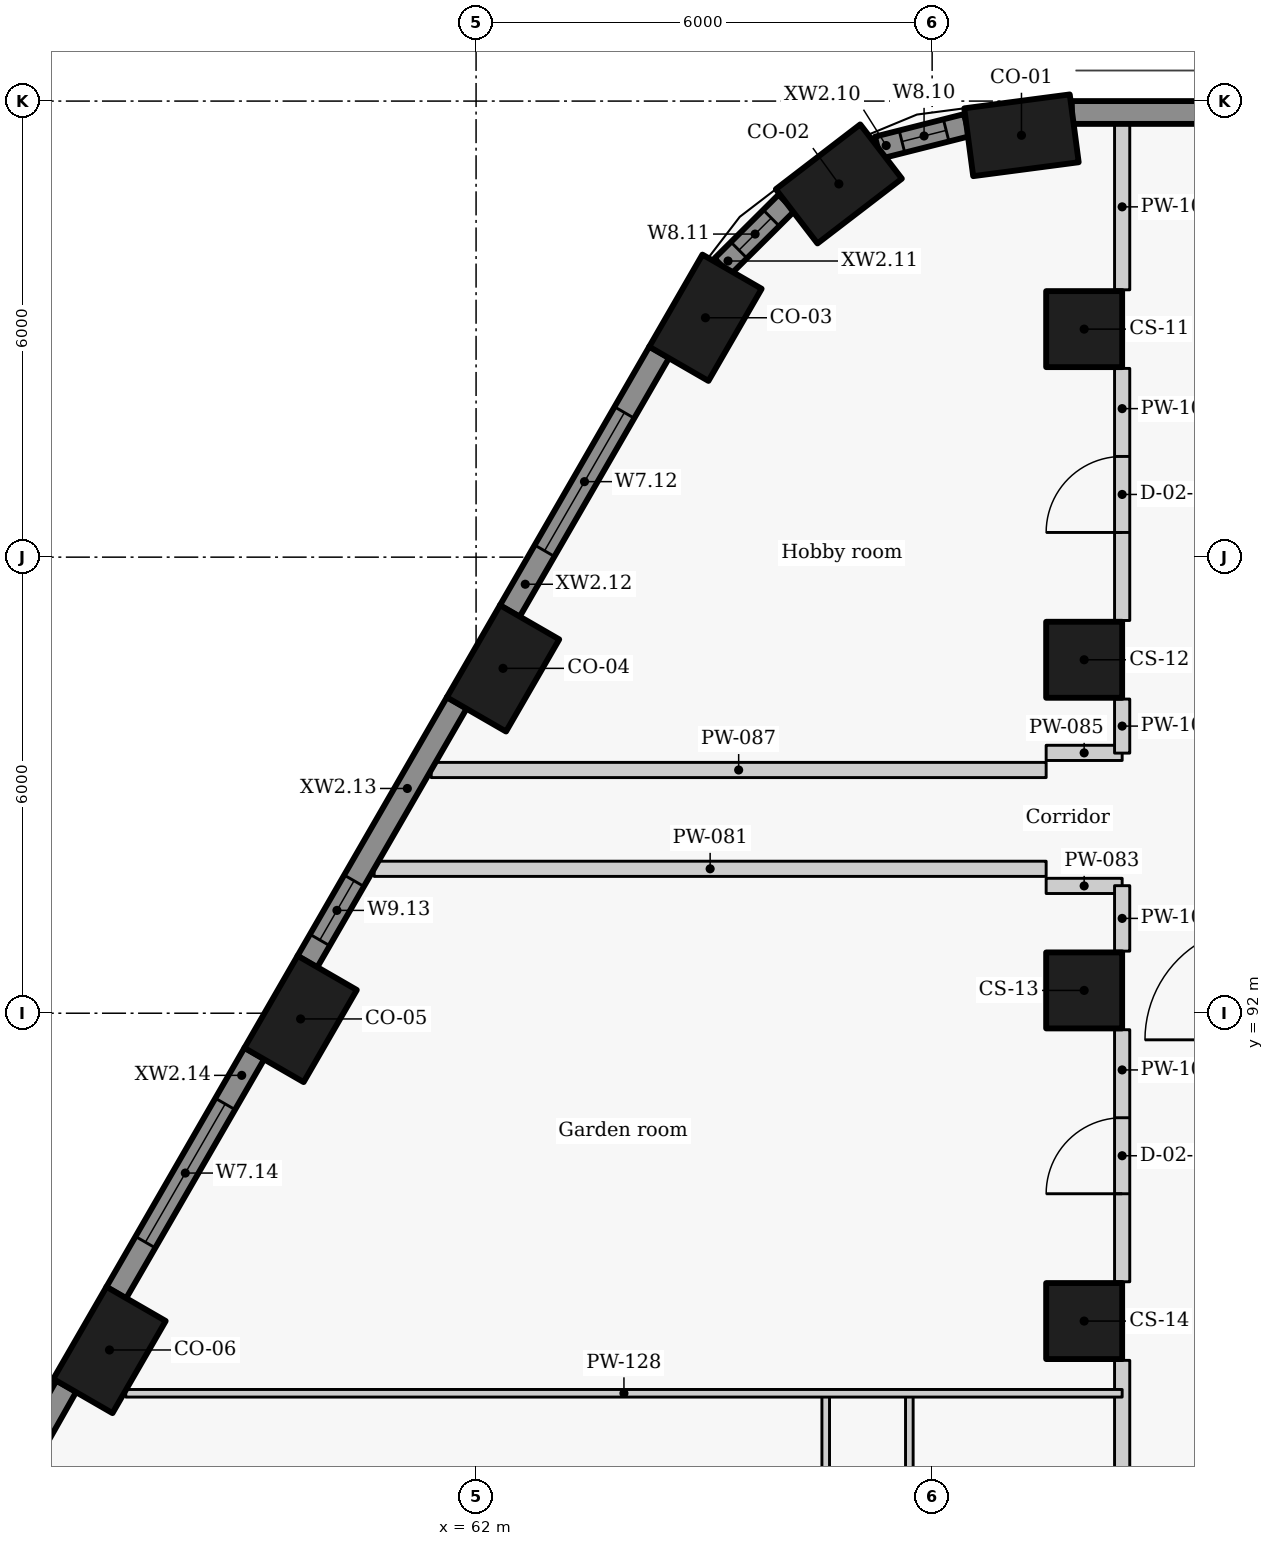
"""IFC4 building model, lengths in metres.
Left out: names, types, materials, properties, quantities, classifications, styles, units other than length and angle.
Written with IfcOpenShell. Run it as: python <this file> out.ifc"""

import sys

from ifc_helpers import new_model, si_unit, direction, frame, frame_2d, origin, origin_2d, place, context, subcontext, project, spatial, rectangle, extrude, element, fill, save


model = new_model("IFC4")
c1 = context("Model", 3, precision=1e-05, world=origin(), true_north=direction((0.0, 1.0)))
c2 = subcontext(c1, "Body", "Model", "MODEL_VIEW")
j1 = project(units=[si_unit("LENGTHUNIT", "METRE"), si_unit("PLANEANGLEUNIT", "RADIAN")], contexts=[c1])
p1 = place(None, origin())
s1 = spatial("IfcSite", under=j1, at=p1, CompositionType="ELEMENT")
p2 = place(p1, origin())
s2 = spatial("IfcBuilding", under=s1, at=p2, CompositionType="ELEMENT")
p3 = place(p2, frame((0.0, 0.0, 97.5)))
s3 = spatial("IfcBuildingStorey", under=s2, at=p3, CompositionType="ELEMENT", Elevation=97.5)
for number, where, z_axis, x_axis in (
    (1, (69.175, 103.55, 0.0), (0.0, 0.0, 1.0), (-0.991, -0.131, 0.0)),
    (2, (66.773, 102.91, 0.0), (0.0, 0.0, 1.0), (-0.793, -0.609, 0.0)),
    (3, (65.018, 101.149, 0.0), (0.0, 0.0, 1.0), (-0.5, -0.866, 0.0)),
    (4, (62.354, 96.537, 0.0), (0.0, 0.0, 1.0), (-0.5, -0.866, 0.0)),
    (5, (59.692, 91.925, 0.0), (0.0, 0.0, 1.0), (-0.5, -0.866, 0.0)),
    (6, (57.177, 87.57, 0.0), (0.0, 0.0, 1.0), (-0.5, -0.866, 0.0)),
):
    element("IfcColumn", number, at=place(p3, frame(where, z_axis=z_axis, x_axis=x_axis)), inside=s3, PredefinedType="COLUMN", context=c2, shape_type="SweptSolid", body=[
        extrude(rectangle(XDim=1.4, YDim=0.9, at=origin_2d()), origin(), (0.0, 0.0, 1.0), 3.3),
    ])
for number, where, z_axis, x_axis in (
    (7, (70.0, 101.0, 0.0), (0.0, 0.0, 1.0), (0.0, -1.0, 0.0)),
    (8, (70.0, 96.65, 0.0), (0.0, 0.0, 1.0), (0.0, -1.0, 0.0)),
    (9, (70.0, 92.3, 0.0), (0.0, 0.0, 1.0), (0.0, -1.0, 0.0)),
    (10, (70.0, 87.95, 0.0), (0.0, 0.0, 1.0), (0.0, -1.0, 0.0)),
):
    element("IfcColumn", number, at=place(p3, frame(where, z_axis=z_axis, x_axis=x_axis)), inside=s3, PredefinedType="COLUMN", context=c2, shape_type="SweptSolid", body=[
        extrude(rectangle(XDim=1.0, YDim=1.0, at=origin_2d()), origin(), (0.0, 0.0, 1.0), 3.3),
    ])
p4 = place(p3, frame((90.129, 103.85, 0.0), z_axis=(0.0, 0.0, 1.0), x_axis=(-1.0, 0.0, 0.0)))
e11 = element("IfcWall", 11, at=p4, inside=s3, PredefinedType="SOLIDWALL", context=c2, shape_type="SweptSolid", body=[
    extrude(rectangle(XDim=20.291, YDim=0.3, at=frame_2d((10.146, 0.0))), origin(), (0.0, 0.0, 1.0), 2.425),
])
p5 = place(p3, frame((68.456, 103.683, 0.0), z_axis=(0.0, 0.0, 1.0), x_axis=(-0.969485113966, -0.245150186208, 0.0)))
e12 = element("IfcWall", 12, at=p5, inside=s3, PredefinedType="SOLIDWALL", context=c2, shape_type="SweptSolid", body=[
    extrude(rectangle(XDim=1.208, YDim=0.3, at=frame_2d((0.604, 0.0))), origin(), (0.0, 0.0, 1.0), 2.425),
])
p6 = place(p5, frame((0.28, 0.0, 0.9)))
e13 = element("IfcOpeningElement", 13, at=p6, cuts=e12, PredefinedType="OPENING", context=c2, shape_type="SweptSolid", body=[
    extrude(rectangle(XDim=0.6, YDim=1.1, at=frame_2d((0.3, 0.55))), frame((0.0, 0.16, 0.0), z_axis=(0.0, -1.0, 0.0), x_axis=(1.0, 0.0, 0.0)), (0.0, 0.0, 1.0), 0.32),
])
p7 = place(p3, frame((66.085, 102.663, 0.0), z_axis=(0.0, 0.0, 1.0), x_axis=(-0.708951665509, -0.705257070842, 0.0)))
e14 = element("IfcWall", 14, at=p7, inside=s3, PredefinedType="SOLIDWALL", context=c2, shape_type="SweptSolid", body=[
    extrude(rectangle(XDim=1.189, YDim=0.3, at=frame_2d((0.595, 0.0))), origin(), (0.0, 0.0, 1.0), 2.425),
])
p8 = place(p7, frame((0.284, 0.0, 0.9)))
e15 = element("IfcOpeningElement", 15, at=p8, cuts=e14, PredefinedType="OPENING", context=c2, shape_type="SweptSolid", body=[
    extrude(rectangle(XDim=0.6, YDim=1.1, at=frame_2d((0.3, 0.55))), frame((0.0, 0.16, 0.0), z_axis=(0.0, -1.0, 0.0), x_axis=(1.0, 0.0, 0.0)), (0.0, 0.0, 1.0), 0.32),
])
p9 = place(p3, frame((64.41, 100.697, 0.0), z_axis=(0.0, 0.0, 1.0), x_axis=(-0.500003583557, -0.866023334807, 0.0)))
e16 = element("IfcWall", 16, at=p9, inside=s3, PredefinedType="SOLIDWALL", context=c2, shape_type="SweptSolid", body=[
    extrude(rectangle(XDim=3.934, YDim=0.3, at=frame_2d((1.967, 0.0))), origin(), (0.0, 0.0, 1.0), 2.425),
])
p10 = place(p9, frame((0.917, 0.0, 0.9)))
e17 = element("IfcOpeningElement", 17, at=p10, cuts=e16, PredefinedType="OPENING", context=c2, shape_type="SweptSolid", body=[
    extrude(rectangle(XDim=2.1, YDim=1.1, at=frame_2d((1.05, 0.55))), frame((0.0, 0.16, 0.0), z_axis=(0.0, -1.0, 0.0), x_axis=(1.0, 0.0, 0.0)), (0.0, 0.0, 1.0), 0.32),
])
p11 = place(p3, frame((61.747, 96.084, 0.0), z_axis=(0.0, 0.0, 1.0), x_axis=(-0.499957037901, -0.866050206543, 0.0)))
e18 = element("IfcWall", 18, at=p11, inside=s3, PredefinedType="SOLIDWALL", context=c2, shape_type="SweptSolid", body=[
    extrude(rectangle(XDim=3.934, YDim=0.3, at=frame_2d((1.967, 0.0))), origin(), (0.0, 0.0, 1.0), 2.425),
])
p12 = place(p11, frame((2.704, 0.0, 0.9)))
e19 = element("IfcOpeningElement", 19, at=p12, cuts=e18, PredefinedType="OPENING", context=c2, shape_type="SweptSolid", body=[
    extrude(rectangle(XDim=0.9, YDim=1.1, at=frame_2d((0.45, 0.55))), frame((0.0, 0.16, 0.0), z_axis=(0.0, -1.0, 0.0), x_axis=(1.0, 0.0, 0.0)), (0.0, 0.0, 1.0), 0.32),
])
p13 = place(p3, frame((59.084, 91.472, 0.0), z_axis=(0.0, 0.0, 1.0), x_axis=(-0.500009139881, -0.866020126807, 0.0)))
e20 = element("IfcWall", 20, at=p13, inside=s3, PredefinedType="SOLIDWALL", context=c2, shape_type="SweptSolid", body=[
    extrude(rectangle(XDim=3.637, YDim=0.3, at=frame_2d((1.818, 0.0))), origin(), (0.0, 0.0, 1.0), 2.425),
])
p14 = place(p13, frame((0.768, 0.0, 0.9)))
e21 = element("IfcOpeningElement", 21, at=p14, cuts=e20, PredefinedType="OPENING", context=c2, shape_type="SweptSolid", body=[
    extrude(rectangle(XDim=2.1, YDim=1.1, at=frame_2d((1.05, 0.55))), frame((0.0, 0.16, 0.0), z_axis=(0.0, -1.0, 0.0), x_axis=(1.0, 0.0, 0.0)), (0.0, 0.0, 1.0), 0.32),
])
p15 = place(p3, frame((56.609, 87.094, 0.0), z_axis=(0.0, 0.0, 1.0), x_axis=(-0.492456858874, -0.870336855561, 0.0)))
e22 = element("IfcWall", 22, at=p15, inside=s3, PredefinedType="SOLIDWALL", context=c2, shape_type="SweptSolid", body=[
    extrude(rectangle(XDim=5.677, YDim=0.3, at=frame_2d((2.838, 0.0))), origin(), (0.0, 0.0, 1.0), 2.425),
])
p16 = place(p15, frame((1.525, 0.0, 0.9)))
e23 = element("IfcOpeningElement", 23, at=p16, cuts=e22, PredefinedType="OPENING", context=c2, shape_type="SweptSolid", body=[
    extrude(rectangle(XDim=2.1, YDim=1.1, at=frame_2d((1.05, 0.55))), frame((0.0, 0.16, 0.0), z_axis=(0.0, -1.0, 0.0), x_axis=(1.0, 0.0, 0.0)), (0.0, 0.0, 1.0), 0.32),
])
p17 = place(p3, frame((60.659, 93.9, 0.0), z_axis=(0.0, 0.0, 1.0), x_axis=(1.0, 0.0, 0.0)))
e24 = element("IfcWall", 24, at=p17, inside=s3, PredefinedType="PARTITIONING", context=c2, shape_type="SweptSolid", body=[
    extrude(rectangle(XDim=8.841, YDim=0.2, at=frame_2d((4.421, 0.0))), origin(), (0.0, 0.0, 1.0), 2.405),
])
for number, where, z_axis, x_axis in (
    (25, (69.5, 93.675, 0.0), (0.0, 0.0, 1.0), (1.0, 0.0, 0.0)),
    (26, (69.5, 95.425, 0.0), (0.0, 0.0, 1.0), (1.0, 0.0, 0.0)),
):
    element("IfcWall", number, at=place(p3, frame(where, z_axis=z_axis, x_axis=x_axis)), inside=s3, PredefinedType="PARTITIONING", context=c2, shape_type="SweptSolid", body=[
        extrude(rectangle(XDim=1.0, YDim=0.2, at=frame_2d((0.5, 0.0))), origin(), (0.0, 0.0, 1.0), 2.505),
    ])
p18 = place(p3, frame((61.409, 95.2, 0.0), z_axis=(0.0, 0.0, 1.0), x_axis=(1.0, 0.0, 0.0)))
e27 = element("IfcWall", 27, at=p18, inside=s3, PredefinedType="PARTITIONING", context=c2, shape_type="SweptSolid", body=[
    extrude(rectangle(XDim=8.091, YDim=0.2, at=frame_2d((4.045, 0.0))), origin(), (0.0, 0.0, 1.0), 2.405),
])
p19 = place(p3, frame((70.5, 83.167, 0.0), z_axis=(0.0, 0.0, 1.0), x_axis=(0.0, 1.0, 0.0)))
e28 = element("IfcWall", 28, at=p19, inside=s3, PredefinedType="PARTITIONING", context=c2, shape_type="SweptSolid", body=[
    extrude(rectangle(XDim=4.266, YDim=0.2, at=frame_2d((2.133, 0.0))), origin(), (0.0, 0.0, 1.0), 3.025),
])
p20 = place(p3, frame((70.5, 88.467, 0.0), z_axis=(0.0, 0.0, 1.0), x_axis=(0.0, 1.0, 0.0)))
e29 = element("IfcWall", 29, at=p20, inside=s3, PredefinedType="PARTITIONING", context=c2, shape_type="SweptSolid", body=[
    extrude(rectangle(XDim=3.316, YDim=0.2, at=frame_2d((1.658, 0.0))), origin(), (0.0, 0.0, 1.0), 3.025),
])
p21 = place(p20, frame((1.158, 0.0, 0.0)))
e30 = element("IfcOpeningElement", 30, at=p21, cuts=e29, PredefinedType="OPENING", context=c2, shape_type="SweptSolid", body=[
    extrude(rectangle(XDim=1.0, YDim=2.1, at=frame_2d((0.5, 1.05))), frame((0.0, 0.11, 0.0), z_axis=(0.0, -1.0, 0.0), x_axis=(1.0, 0.0, 0.0)), (0.0, 0.0, 1.0), 0.22),
])
p22 = place(p3, frame((70.5, 92.817, 0.0), z_axis=(0.0, 0.0, 1.0), x_axis=(0.0, 1.0, 0.0)))
e31 = element("IfcWall", 31, at=p22, inside=s3, PredefinedType="PARTITIONING", context=c2, shape_type="SweptSolid", body=[
    extrude(rectangle(XDim=0.861, YDim=0.2, at=frame_2d((0.431, 0.0))), origin(), (0.0, 0.0, 1.0), 3.025),
])
p23 = place(p3, frame((70.5, 95.422, 0.0), z_axis=(0.0, 0.0, 1.0), x_axis=(0.0, 1.0, 0.0)))
e32 = element("IfcWall", 32, at=p23, inside=s3, PredefinedType="PARTITIONING", context=c2, shape_type="SweptSolid", body=[
    extrude(rectangle(XDim=0.711, YDim=0.2, at=frame_2d((0.355, 0.0))), origin(), (0.0, 0.0, 1.0), 3.025),
])
p24 = place(p3, frame((70.5, 97.167, 0.0), z_axis=(0.0, 0.0, 1.0), x_axis=(0.0, 1.0, 0.0)))
e33 = element("IfcWall", 33, at=p24, inside=s3, PredefinedType="PARTITIONING", context=c2, shape_type="SweptSolid", body=[
    extrude(rectangle(XDim=3.316, YDim=0.2, at=frame_2d((1.658, 0.0))), origin(), (0.0, 0.0, 1.0), 3.025),
])
p25 = place(p24, frame((1.158, 0.0, 0.0)))
e34 = element("IfcOpeningElement", 34, at=p25, cuts=e33, PredefinedType="OPENING", context=c2, shape_type="SweptSolid", body=[
    extrude(rectangle(XDim=1.0, YDim=2.1, at=frame_2d((0.5, 1.05))), frame((0.0, 0.11, 0.0), z_axis=(0.0, -1.0, 0.0), x_axis=(1.0, 0.0, 0.0)), (0.0, 0.0, 1.0), 0.22),
])
p26 = place(p3, frame((70.5, 101.517, 0.0), z_axis=(0.0, 0.0, 1.0), x_axis=(0.0, 1.0, 0.0)))
e35 = element("IfcWall", 35, at=p26, inside=s3, PredefinedType="PARTITIONING", context=c2, shape_type="SweptSolid", body=[
    extrude(rectangle(XDim=2.183, YDim=0.2, at=frame_2d((1.091, 0.0))), origin(), (0.0, 0.0, 1.0), 3.025),
])
p27 = place(p3, frame((67.7, 87.0, 0.0), z_axis=(0.0, 0.0, 1.0), x_axis=(0.0, -1.0, 0.0)))
e36 = element("IfcWall", 36, at=p27, inside=s3, PredefinedType="PARTITIONING", context=c2, shape_type="SweptSolid", body=[
    extrude(rectangle(XDim=7.4, YDim=0.1, at=frame_2d((3.7, 0.0))), origin(), (0.0, 0.0, 1.0), 3.025),
])
p28 = place(p27, frame((5.293, 0.0, 0.0)))
e37 = element("IfcOpeningElement", 37, at=p28, cuts=e36, PredefinedType="OPENING", context=c2, shape_type="SweptSolid", body=[
    extrude(rectangle(XDim=0.85, YDim=2.1, at=frame_2d((0.425, 1.05))), frame((0.0, 0.06, 0.0), z_axis=(0.0, -1.0, 0.0), x_axis=(1.0, 0.0, 0.0)), (0.0, 0.0, 1.0), 0.12),
])
p29 = place(p27, frame((1.568, 0.0, 0.0)))
e38 = element("IfcOpeningElement", 38, at=p29, cuts=e36, PredefinedType="OPENING", context=c2, shape_type="SweptSolid", body=[
    extrude(rectangle(XDim=0.9, YDim=2.1, at=frame_2d((0.45, 1.05))), frame((0.0, 0.06, 0.0), z_axis=(0.0, -1.0, 0.0), x_axis=(1.0, 0.0, 0.0)), (0.0, 0.0, 1.0), 0.12),
])
p30 = place(p3, frame((66.6, 66.8, 0.0), z_axis=(0.0, 0.0, 1.0), x_axis=(0.0, 1.0, 0.0)))
e39 = element("IfcWall", 39, at=p30, inside=s3, PredefinedType="PARTITIONING", context=c2, shape_type="SweptSolid", body=[
    extrude(rectangle(XDim=20.2, YDim=0.1, at=frame_2d((10.1, 0.0))), origin(), (0.0, 0.0, 1.0), 3.025),
])
p31 = place(p30, frame((1.176, 0.0, 0.0)))
e40 = element("IfcOpeningElement", 40, at=p31, cuts=e39, PredefinedType="OPENING", context=c2, shape_type="SweptSolid", body=[
    extrude(rectangle(XDim=0.9, YDim=2.1, at=frame_2d((0.45, 1.05))), frame((0.0, 0.06, 0.0), z_axis=(0.0, -1.0, 0.0), x_axis=(1.0, 0.0, 0.0)), (0.0, 0.0, 1.0), 0.12),
])
p32 = place(p30, frame((5.15, 0.0, 0.0)))
e41 = element("IfcOpeningElement", 41, at=p32, cuts=e39, PredefinedType="OPENING", context=c2, shape_type="SweptSolid", body=[
    extrude(rectangle(XDim=0.9, YDim=2.1, at=frame_2d((0.45, 1.05))), frame((0.0, 0.06, 0.0), z_axis=(0.0, -1.0, 0.0), x_axis=(1.0, 0.0, 0.0)), (0.0, 0.0, 1.0), 0.12),
])
p33 = place(p30, frame((9.124, 0.0, 0.0)))
e42 = element("IfcOpeningElement", 42, at=p33, cuts=e39, PredefinedType="OPENING", context=c2, shape_type="SweptSolid", body=[
    extrude(rectangle(XDim=0.9, YDim=2.1, at=frame_2d((0.45, 1.05))), frame((0.0, 0.06, 0.0), z_axis=(0.0, -1.0, 0.0), x_axis=(1.0, 0.0, 0.0)), (0.0, 0.0, 1.0), 0.12),
])
p34 = place(p30, frame((15.25, 0.0, 0.0)))
e43 = element("IfcOpeningElement", 43, at=p34, cuts=e39, PredefinedType="OPENING", context=c2, shape_type="SweptSolid", body=[
    extrude(rectangle(XDim=0.9, YDim=2.1, at=frame_2d((0.45, 1.05))), frame((0.0, 0.06, 0.0), z_axis=(0.0, -1.0, 0.0), x_axis=(1.0, 0.0, 0.0)), (0.0, 0.0, 1.0), 0.12),
])
p35 = place(p3, frame((57.391, 87.0, 0.0), z_axis=(0.0, 0.0, 1.0), x_axis=(1.0, 0.0, 0.0)))
e44 = element("IfcWall", 44, at=p35, inside=s3, PredefinedType="PARTITIONING", context=c2, shape_type="SweptSolid", body=[
    extrude(rectangle(XDim=13.109, YDim=0.1, at=frame_2d((6.555, 0.0))), origin(), (0.0, 0.0, 1.0), 2.505),
])
p36 = place(p6, origin())
e45 = element("IfcWindow", 45, at=p36, inside=s3, PartitioningType="SINGLE_PANEL", PredefinedType="WINDOW", context=c2, shape_type="SweptSolid", body=[
    extrude(rectangle(XDim=0.6, YDim=1.1, at=frame_2d((0.3, 0.55))), frame((0.0, 0.03, 0.0), z_axis=(0.0, -1.0, 0.0), x_axis=(1.0, 0.0, 0.0)), (0.0, 0.0, 1.0), 0.06),
])
fill(e13, e45)
p37 = place(p8, origin())
e46 = element("IfcWindow", 46, at=p37, inside=s3, PartitioningType="SINGLE_PANEL", PredefinedType="WINDOW", context=c2, shape_type="SweptSolid", body=[
    extrude(rectangle(XDim=0.6, YDim=1.1, at=frame_2d((0.3, 0.55))), frame((0.0, 0.03, 0.0), z_axis=(0.0, -1.0, 0.0), x_axis=(1.0, 0.0, 0.0)), (0.0, 0.0, 1.0), 0.06),
])
fill(e15, e46)
p38 = place(p10, origin())
e47 = element("IfcWindow", 47, at=p38, inside=s3, PartitioningType="SINGLE_PANEL", PredefinedType="WINDOW", context=c2, shape_type="SweptSolid", body=[
    extrude(rectangle(XDim=2.1, YDim=1.1, at=frame_2d((1.05, 0.55))), frame((0.0, 0.03, 0.0), z_axis=(0.0, -1.0, 0.0), x_axis=(1.0, 0.0, 0.0)), (0.0, 0.0, 1.0), 0.06),
])
fill(e17, e47)
p39 = place(p12, origin())
e48 = element("IfcWindow", 48, at=p39, inside=s3, PartitioningType="SINGLE_PANEL", PredefinedType="WINDOW", context=c2, shape_type="SweptSolid", body=[
    extrude(rectangle(XDim=0.9, YDim=1.1, at=frame_2d((0.45, 0.55))), frame((0.0, 0.03, 0.0), z_axis=(0.0, -1.0, 0.0), x_axis=(1.0, 0.0, 0.0)), (0.0, 0.0, 1.0), 0.06),
])
fill(e19, e48)
p40 = place(p14, origin())
e49 = element("IfcWindow", 49, at=p40, inside=s3, PartitioningType="SINGLE_PANEL", PredefinedType="WINDOW", context=c2, shape_type="SweptSolid", body=[
    extrude(rectangle(XDim=2.1, YDim=1.1, at=frame_2d((1.05, 0.55))), frame((0.0, 0.03, 0.0), z_axis=(0.0, -1.0, 0.0), x_axis=(1.0, 0.0, 0.0)), (0.0, 0.0, 1.0), 0.06),
])
fill(e21, e49)
p41 = place(p21, origin())
e50 = element("IfcDoor", 50, at=p41, inside=s3, OperationType="SINGLE_SWING_LEFT", PredefinedType="DOOR", context=c2, shape_type="SweptSolid", body=[
    extrude(rectangle(XDim=1.0, YDim=2.1, at=frame_2d((0.5, 1.05))), frame((0.0, 0.025, 0.0), z_axis=(0.0, -1.0, 0.0), x_axis=(1.0, 0.0, 0.0)), (0.0, 0.0, 1.0), 0.05),
])
fill(e30, e50)
p42 = place(p25, origin())
e51 = element("IfcDoor", 51, at=p42, inside=s3, OperationType="SINGLE_SWING_LEFT", PredefinedType="DOOR", context=c2, shape_type="SweptSolid", body=[
    extrude(rectangle(XDim=1.0, YDim=2.1, at=frame_2d((0.5, 1.05))), frame((0.0, 0.025, 0.0), z_axis=(0.0, -1.0, 0.0), x_axis=(1.0, 0.0, 0.0)), (0.0, 0.0, 1.0), 0.05),
])
fill(e34, e51)
save(model, sys.argv[1])
